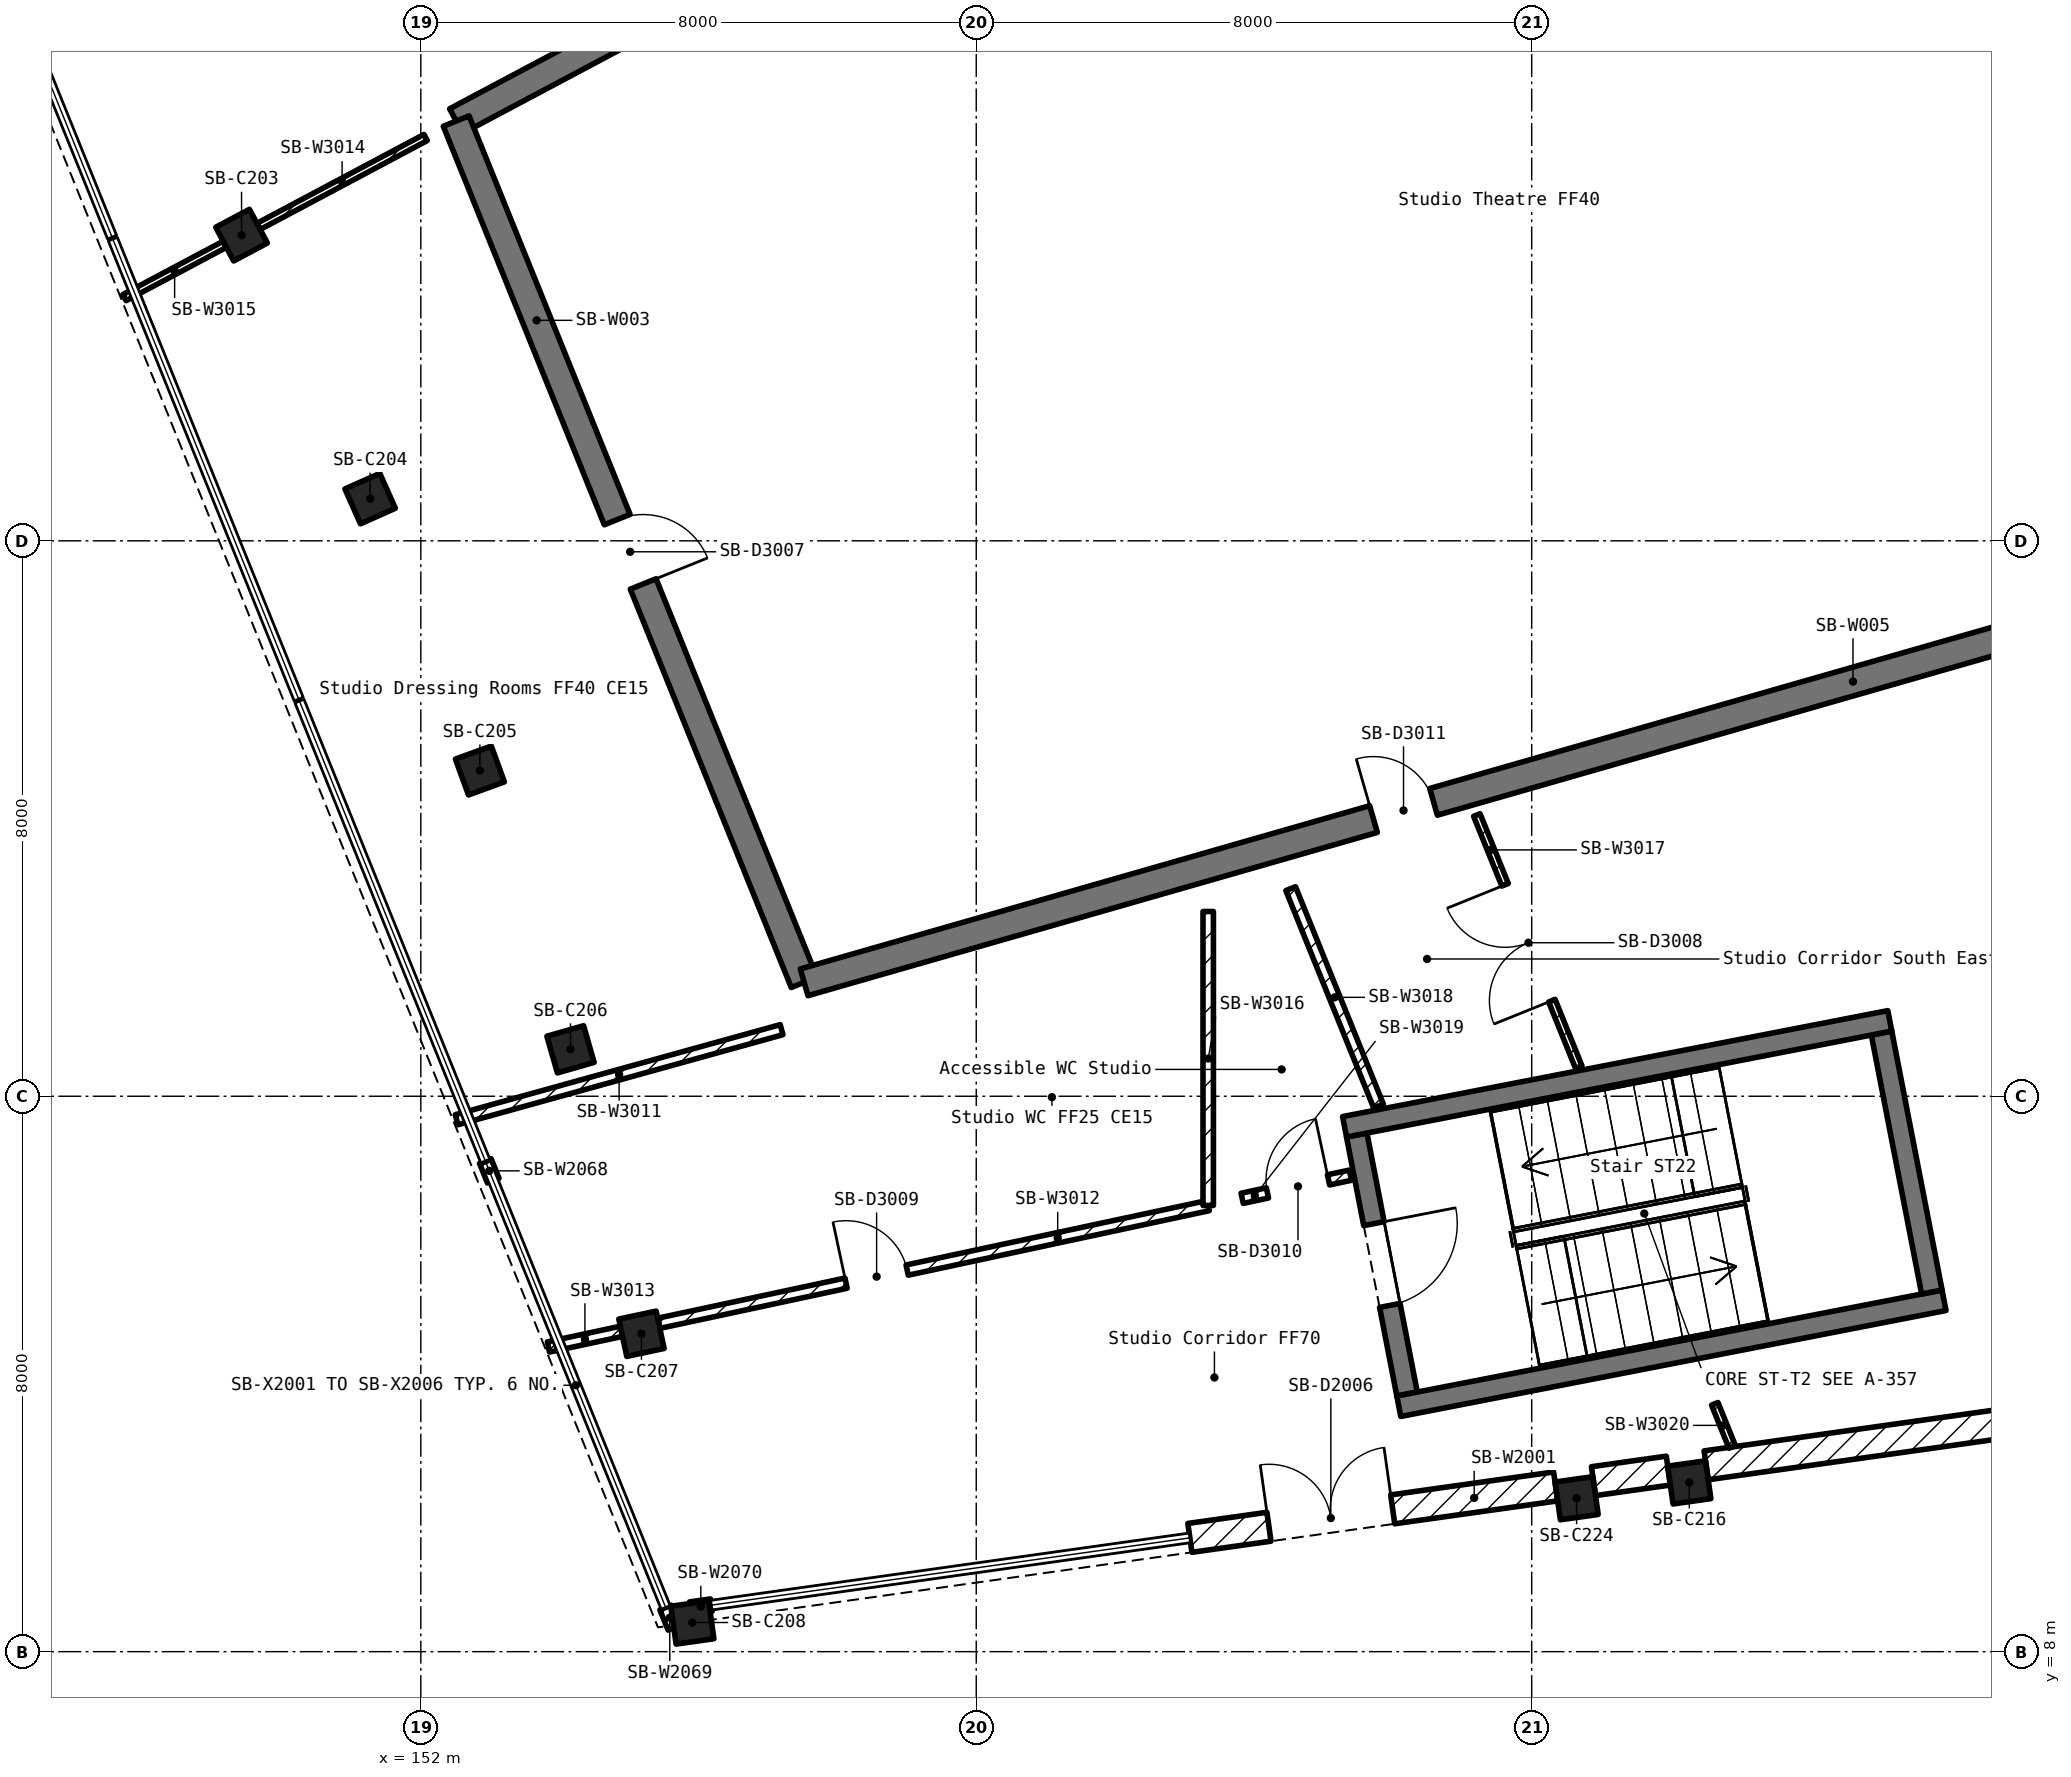
"""IFC4 building model, lengths in metres.
Left out: names, types, materials, properties, quantities, classifications, styles, units other than length and angle.
Written with IfcOpenShell. Run it as: python <this file> out.ifc"""

import sys

from ifc_helpers import new_model, si_unit, direction, frame, frame_2d, origin, origin_2d, place, context, subcontext, project, spatial, rectangle, extrude, element, fill, save


model = new_model("IFC4")
c1 = context("Model", 3, precision=1e-05, world=origin(), true_north=direction((0.0, 1.0)))
c2 = subcontext(c1, "Body", "Model", "MODEL_VIEW")
j1 = project(units=[si_unit("LENGTHUNIT", "METRE"), si_unit("PLANEANGLEUNIT", "RADIAN")], contexts=[c1])
p1 = place(None, origin())
s1 = spatial("IfcSite", under=j1, at=p1, CompositionType="ELEMENT")
p2 = place(p1, origin())
s2 = spatial("IfcBuilding", under=s1, at=p2, CompositionType="ELEMENT")
p3 = place(p2, origin())
s3 = spatial("IfcBuildingStorey", under=s2, at=p3, CompositionType="ELEMENT", Elevation=0.0)
for number, where, z_axis, x_axis in (
    (1, (149.418, 28.403, 0.0), (0.0, 0.0, 1.0), (0.469, -0.883, 0.0)),
    (2, (151.27, 24.608, 0.0), (0.0, 0.0, 1.0), (0.407, -0.914, 0.0)),
    (3, (152.851, 20.692, 0.0), (0.0, 0.0, 1.0), (0.342, -0.94, 0.0)),
    (4, (154.156, 16.676, 0.0), (0.0, 0.0, 1.0), (0.276, -0.961, 0.0)),
    (5, (155.178, 12.579, 0.0), (0.0, 0.0, 1.0), (0.208, -0.978, 0.0)),
    (6, (155.911, 8.42, 0.0), (0.0, 0.0, 1.0), (0.139, -0.99, 0.0)),
    (7, (170.27, 10.438, 0.0), (0.0, 0.0, 1.0), (0.139, -0.99, 0.0)),
    (8, (168.647, 10.21, 0.0), (0.0, 0.0, 1.0), (0.139, -0.99, 0.0)),
):
    element("IfcColumn", number, at=place(p3, frame(where, z_axis=z_axis, x_axis=x_axis)), inside=s3, PredefinedType="COLUMN", context=c2, shape_type="SweptSolid", body=[
        extrude(rectangle(XDim=0.55, YDim=0.55, at=origin_2d()), origin(), (0.0, 0.0, 1.0), 6.0),
    ])
p4 = place(p3, frame((171.933, 40.375, -6.3), z_axis=(0.0, 0.0, 1.0), x_axis=(-0.882926128241, -0.469511929634, 0.0)))
e9 = element("IfcWall", 9, at=p4, inside=s3, PredefinedType="SHEAR", context=c2, shape_type="SweptSolid", body=[
    extrude(rectangle(XDim=22.0, YDim=0.4, at=frame_2d((11.0, 0.0))), origin(), (0.0, 0.0, 1.0), 12.3),
])
p5 = place(p3, frame((152.509, 30.046, -6.3), z_axis=(0.0, 0.0, 1.0), x_axis=(0.374613299166, -0.92718114524, 0.0)))
e10 = element("IfcWall", 10, at=p5, inside=s3, PredefinedType="SHEAR", context=c2, shape_type="SweptSolid", body=[
    extrude(rectangle(XDim=13.379, YDim=0.4, at=frame_2d((6.689, 0.0))), origin(), (0.0, 0.0, 1.0), 12.3),
])
p6 = place(p5, frame((6.191, 0.0, 6.3)))
e11 = element("IfcOpeningElement", 11, at=p6, cuts=e10, PredefinedType="OPENING", context=c2, shape_type="SweptSolid", body=[
    extrude(rectangle(XDim=1.0, YDim=2.1, at=frame_2d((0.5, 1.05))), frame((0.0, 0.212, 0.0), z_axis=(0.0, -1.0, 0.0), x_axis=(1.0, 0.0, 0.0)), (0.0, 0.0, 1.0), 0.424),
])
p7 = place(p3, frame((157.521, 17.641, -6.3), z_axis=(0.0, 0.0, 1.0), x_axis=(0.961263044958, 0.275632651182, 0.0)))
e12 = element("IfcWall", 12, at=p7, inside=s3, PredefinedType="SHEAR", context=c2, shape_type="SweptSolid", body=[
    extrude(rectangle(XDim=22.0, YDim=0.4, at=frame_2d((11.0, 0.0))), origin(), (0.0, 0.0, 1.0), 12.3),
])
p8 = place(p7, frame((8.531, 0.0, 6.3)))
e13 = element("IfcOpeningElement", 13, at=p8, cuts=e12, PredefinedType="OPENING", context=c2, shape_type="SweptSolid", body=[
    extrude(rectangle(XDim=0.9, YDim=2.1, at=frame_2d((0.45, 1.05))), frame((0.0, 0.212, 0.0), z_axis=(0.0, -1.0, 0.0), x_axis=(1.0, 0.0, 0.0)), (0.0, 0.0, 1.0), 0.424),
])
p9 = place(p3, frame((178.669, 23.705, -6.3), z_axis=(0.0, 0.0, 1.0), x_axis=(-0.374642655757, 0.92716928362, 0.0)))
e14 = element("IfcWall", 14, at=p9, inside=s3, PredefinedType="SHEAR", context=c2, shape_type="SweptSolid", body=[
    extrude(rectangle(XDim=17.979, YDim=0.4, at=frame_2d((8.99, 0.0))), origin(), (0.0, 0.0, 1.0), 12.3),
])
p10 = place(p9, frame((8.09, 0.0, 6.3)))
e15 = element("IfcOpeningElement", 15, at=p10, cuts=e14, PredefinedType="OPENING", context=c2, shape_type="SweptSolid", body=[
    extrude(rectangle(XDim=1.8, YDim=2.1, at=frame_2d((0.9, 1.05))), frame((0.0, 0.212, 0.0), z_axis=(0.0, -1.0, 0.0), x_axis=(1.0, 0.0, 0.0)), (0.0, 0.0, 1.0), 0.424),
])
p11 = place(p9, frame((12.59, 0.0, 6.3)))
e16 = element("IfcOpeningElement", 16, at=p11, cuts=e14, PredefinedType="OPENING", context=c2, shape_type="SweptSolid", body=[
    extrude(rectangle(XDim=1.8, YDim=2.1, at=frame_2d((0.9, 1.05))), frame((0.0, 0.212, 0.0), z_axis=(0.0, -1.0, 0.0), x_axis=(1.0, 0.0, 0.0)), (0.0, 0.0, 1.0), 0.424),
])
p12 = place(p3, frame((163.077, 9.639, 0.0), z_axis=(0.0, 0.0, 1.0), x_axis=(0.990252820999, 0.139281551197, 0.0)))
e17 = element("IfcWall", 17, at=p12, inside=s3, PredefinedType="SOLIDWALL", context=c2, shape_type="SweptSolid", body=[
    extrude(rectangle(XDim=5.32, YDim=0.42, at=frame_2d((2.66, 0.0))), origin(), (0.0, 0.0, 1.0), 4.98),
])
p13 = place(p12, frame((1.15, 0.0, 0.0)))
e18 = element("IfcOpeningElement", 18, at=p13, cuts=e17, PredefinedType="OPENING", context=c2, shape_type="SweptSolid", body=[
    extrude(rectangle(XDim=1.8, YDim=2.4, at=frame_2d((0.9, 1.2))), frame((0.0, 0.222, 0.0), z_axis=(0.0, -1.0, 0.0), x_axis=(1.0, 0.0, 0.0)), (0.0, 0.0, 1.0), 0.444),
])
p14 = place(p3, frame((168.89, 10.456, 0.0), z_axis=(0.0, 0.0, 1.0), x_axis=(0.990225632743, 0.139474715481, 0.0)))
e19 = element("IfcWall", 19, at=p14, inside=s3, PredefinedType="SOLIDWALL", context=c2, shape_type="SweptSolid", body=[
    extrude(rectangle(XDim=1.089, YDim=0.42, at=frame_2d((0.544, 0.0))), origin(), (0.0, 0.0, 1.0), 4.98),
])
p15 = place(p3, frame((170.513, 10.684, 0.0), z_axis=(0.0, 0.0, 1.0), x_axis=(0.990259181758, 0.139236320493, 0.0)))
e20 = element("IfcWall", 20, at=p15, inside=s3, PredefinedType="SOLIDWALL", context=c2, shape_type="SweptSolid", body=[
    extrude(rectangle(XDim=7.275, YDim=0.42, at=frame_2d((3.637, 0.0))), origin(), (0.0, 0.0, 1.0), 5.78),
])
p16 = place(p3, frame((165.48, 15.441, 0.0), z_axis=(0.0, 0.0, 1.0), x_axis=(0.190824946063, -0.981624082814, 0.0)))
e21 = element("IfcWall", 21, at=p16, inside=s3, PredefinedType="SOLIDWALL", context=c2, shape_type="SweptSolid", body=[
    extrude(rectangle(XDim=3.8, YDim=0.3, at=frame_2d((1.9, 0.0))), origin(), (0.0, 0.0, 1.0), 6.0),
])
p17 = place(p16, frame((1.3, 0.0, 0.0)))
e22 = element("IfcOpeningElement", 22, at=p17, cuts=e21, PredefinedType="OPENING", context=c2, shape_type="SweptSolid", body=[
    extrude(rectangle(XDim=1.2, YDim=2.1, at=frame_2d((0.6, 1.05))), frame((0.0, 0.162, 0.0), z_axis=(0.0, -1.0, 0.0), x_axis=(1.0, 0.0, 0.0)), (0.0, 0.0, 1.0), 0.324),
])
p18 = place(p3, frame((166.086, 11.535, 0.0), z_axis=(0.0, 0.0, 1.0), x_axis=(0.981635396686, 0.190766737073, 0.0)))
e23 = element("IfcWall", 23, at=p18, inside=s3, PredefinedType="SOLIDWALL", context=c2, shape_type="SweptSolid", body=[
    extrude(rectangle(XDim=8.0, YDim=0.3, at=frame_2d((4.0, 0.0))), origin(), (0.0, 0.0, 1.0), 6.0),
])
p19 = place(p3, frame((173.764, 13.18, 0.0), z_axis=(0.0, 0.0, 1.0), x_axis=(-0.190763033741, 0.981636116368, 0.0)))
e24 = element("IfcWall", 24, at=p19, inside=s3, PredefinedType="SOLIDWALL", context=c2, shape_type="SweptSolid", body=[
    extrude(rectangle(XDim=3.8, YDim=0.3, at=frame_2d((1.9, 0.0))), origin(), (0.0, 0.0, 1.0), 6.0),
])
p20 = place(p3, frame((173.158, 17.086, 0.0), z_axis=(0.0, 0.0, 1.0), x_axis=(-0.981641111144, -0.190737329623, 0.0)))
e25 = element("IfcWall", 25, at=p20, inside=s3, PredefinedType="SOLIDWALL", context=c2, shape_type="SweptSolid", body=[
    extrude(rectangle(XDim=8.0, YDim=0.3, at=frame_2d((4.0, 0.0))), origin(), (0.0, 0.0, 1.0), 6.0),
])
p21 = place(p3, frame((152.516, 15.662, 0.0), z_axis=(0.0, 0.0, 1.0), x_axis=(0.963682662367, 0.267050044473, 0.0)))
e26 = element("IfcWall", 26, at=p21, inside=s3, PredefinedType="PARTITIONING", context=c2, shape_type="SweptSolid", body=[
    extrude(rectangle(XDim=4.856, YDim=0.15, at=frame_2d((2.428, 0.0))), origin(), (0.0, 0.0, 1.0), 4.88),
])
p22 = place(p3, frame((155.428, 12.73, 0.0), z_axis=(0.0, 0.0, 1.0), x_axis=(0.977817422175, 0.209459038694, 0.0)))
e27 = element("IfcWall", 27, at=p22, inside=s3, PredefinedType="PARTITIONING", context=c2, shape_type="SweptSolid", body=[
    extrude(rectangle(XDim=8.093, YDim=0.15, at=frame_2d((4.046, 0.0))), origin(), (0.0, 0.0, 1.0), 4.88),
])
p23 = place(p22, frame((2.758, 0.0, 0.0)))
e28 = element("IfcOpeningElement", 28, at=p23, cuts=e27, PredefinedType="OPENING", context=c2, shape_type="SweptSolid", body=[
    extrude(rectangle(XDim=0.9, YDim=2.1, at=frame_2d((0.45, 1.05))), frame((0.0, 0.087, 0.0), z_axis=(0.0, -1.0, 0.0), x_axis=(1.0, 0.0, 0.0)), (0.0, 0.0, 1.0), 0.174),
])
p24 = place(p3, frame((153.838, 12.389, 0.0), z_axis=(0.0, 0.0, 1.0), x_axis=(0.977825675762, 0.209420504774, 0.0)))
e29 = element("IfcWall", 29, at=p24, inside=s3, PredefinedType="PARTITIONING", context=c2, shape_type="SweptSolid", body=[
    extrude(rectangle(XDim=1.075, YDim=0.15, at=frame_2d((0.538, 0.0))), origin(), (0.0, 0.0, 1.0), 4.88),
])
p25 = place(p3, frame((149.663, 28.529, 0.0), z_axis=(0.0, 0.0, 1.0), x_axis=(0.882836035131, 0.469681312247, 0.0)))
e30 = element("IfcWall", 30, at=p25, inside=s3, PredefinedType="PARTITIONING", context=c2, shape_type="SweptSolid", body=[
    extrude(rectangle(XDim=2.725, YDim=0.1, at=frame_2d((1.363, 0.0))), origin(), (0.0, 0.0, 1.0), 4.88),
])
p26 = place(p3, frame((147.732, 27.503, 0.0), z_axis=(0.0, 0.0, 1.0), x_axis=(0.882889505907, 0.469580792153, 0.0)))
e31 = element("IfcWall", 31, at=p26, inside=s3, PredefinedType="PARTITIONING", context=c2, shape_type="SweptSolid", body=[
    extrude(rectangle(XDim=1.636, YDim=0.1, at=frame_2d((0.818, 0.0))), origin(), (0.0, 0.0, 1.0), 4.88),
])
p27 = place(p3, frame((163.341, 14.427, 0.0), z_axis=(0.0, 0.0, 1.0), x_axis=(0.0, 1.0, 0.0)))
e32 = element("IfcWall", 32, at=p27, inside=s3, PredefinedType="PARTITIONING", context=c2, shape_type="SweptSolid", body=[
    extrude(rectangle(XDim=4.234, YDim=0.15, at=frame_2d((2.117, 0.0))), origin(), (0.0, 0.0, 1.0), 4.88),
])
p28 = place(p3, frame((168.678, 16.419, 0.0), z_axis=(0.0, 0.0, 1.0), x_axis=(-0.374729910149, 0.927134021833, 0.0)))
e33 = element("IfcWall", 33, at=p28, inside=s3, PredefinedType="PARTITIONING", context=c2, shape_type="SweptSolid", body=[
    extrude(rectangle(XDim=3.917, YDim=0.1, at=frame_2d((1.959, 0.0))), origin(), (0.0, 0.0, 1.0), 4.88),
])
p29 = place(p28, frame((1.033, 0.0, 0.0)))
e34 = element("IfcOpeningElement", 34, at=p29, cuts=e33, PredefinedType="OPENING", context=c2, shape_type="SweptSolid", body=[
    extrude(rectangle(XDim=1.8, YDim=2.1, at=frame_2d((0.9, 1.05))), frame((0.0, 0.062, 0.0), z_axis=(0.0, -1.0, 0.0), x_axis=(1.0, 0.0, 0.0)), (0.0, 0.0, 1.0), 0.124),
])
p30 = place(p3, frame((165.794, 15.859, 0.0), z_axis=(0.0, 0.0, 1.0), x_axis=(-0.374567043553, 0.927199832767, 0.0)))
e35 = element("IfcWall", 35, at=p30, inside=s3, PredefinedType="PARTITIONING", context=c2, shape_type="SweptSolid", body=[
    extrude(rectangle(XDim=3.377, YDim=0.15, at=frame_2d((1.688, 0.0))), origin(), (0.0, 0.0, 1.0), 4.88),
])
p31 = place(p3, frame((163.83, 14.53, 0.0), z_axis=(0.0, 0.0, 1.0), x_axis=(0.97793446098, 0.208911919307, 0.0)))
e36 = element("IfcWall", 36, at=p31, inside=s3, PredefinedType="PARTITIONING", context=c2, shape_type="SweptSolid", body=[
    extrude(rectangle(XDim=1.594, YDim=0.15, at=frame_2d((0.797, 0.0))), origin(), (0.0, 0.0, 1.0), 4.88),
])
p32 = place(p31, frame((0.372, 0.0, 0.0)))
e37 = element("IfcOpeningElement", 37, at=p32, cuts=e36, PredefinedType="OPENING", context=c2, shape_type="SweptSolid", body=[
    extrude(rectangle(XDim=0.9, YDim=2.1, at=frame_2d((0.45, 1.05))), frame((0.0, 0.087, 0.0), z_axis=(0.0, -1.0, 0.0), x_axis=(1.0, 0.0, 0.0)), (0.0, 0.0, 1.0), 0.174),
])
p33 = place(p3, frame((170.888, 10.949, 0.0), z_axis=(0.0, 0.0, 1.0), x_axis=(-0.374655870393, 0.927163943852, 0.0)))
e38 = element("IfcWall", 38, at=p33, inside=s3, PredefinedType="PARTITIONING", context=c2, shape_type="SweptSolid", body=[
    extrude(rectangle(XDim=0.67, YDim=0.1, at=frame_2d((0.335, 0.0))), origin(), (0.0, 0.0, 1.0), 4.88),
])
p34 = place(p3, frame((152.929, 15.067, 0.0), z_axis=(0.0, 0.0, 1.0), x_axis=(0.373735167079, -0.927535457483, 0.0)))
e39 = element("IfcWall", 39, at=p34, inside=s3, PredefinedType="SOLIDWALL", context=c2, shape_type="SweptSolid", body=[
    extrude(rectangle(XDim=0.305, YDim=0.18, at=frame_2d((0.153, 0.0))), origin(), (0.0, 0.0, 1.0), 4.93),
])
p35 = place(p3, frame((155.527, 8.636, 0.0), z_axis=(0.0, 0.0, 1.0), x_axis=(0.374463049601, -0.927241837108, 0.0)))
e40 = element("IfcWall", 40, at=p35, inside=s3, PredefinedType="SOLIDWALL", context=c2, shape_type="SweptSolid", body=[
    extrude(rectangle(XDim=0.315, YDim=0.18, at=frame_2d((0.157, 0.0))), origin(), (0.0, 0.0, 1.0), 4.93),
])
p36 = place(p3, frame((156.184, 8.67, 0.0), z_axis=(0.0, 0.0, 1.0), x_axis=(-0.99047104668, -0.137721115626, 0.0)))
e41 = element("IfcWall", 41, at=p36, inside=s3, PredefinedType="SOLIDWALL", context=c2, shape_type="SweptSolid", body=[
    extrude(rectangle(XDim=0.305, YDim=0.18, at=frame_2d((0.152, 0.0))), origin(), (0.0, 0.0, 1.0), 4.13),
])
p37 = place(p17, origin())
e42 = element("IfcDoor", 42, at=p37, inside=s3, OperationType="SINGLE_SWING_LEFT", PredefinedType="DOOR", context=c2, shape_type="SweptSolid", body=[
    extrude(rectangle(XDim=1.2, YDim=2.1, at=frame_2d((0.6, 1.05))), frame((0.0, 0.025, 0.0), z_axis=(0.0, -1.0, 0.0), x_axis=(1.0, 0.0, 0.0)), (0.0, 0.0, 1.0), 0.05),
])
fill(e22, e42)
p38 = place(p6, origin())
e43 = element("IfcDoor", 43, at=p38, inside=s3, OperationType="SINGLE_SWING_RIGHT", PredefinedType="DOOR", context=c2, shape_type="SweptSolid", body=[
    extrude(rectangle(XDim=1.0, YDim=2.1, at=frame_2d((0.5, 1.05))), frame((0.0, 0.025, 0.0), z_axis=(0.0, -1.0, 0.0), x_axis=(1.0, 0.0, 0.0)), (0.0, 0.0, 1.0), 0.05),
])
fill(e11, e43)
p39 = place(p29, origin())
e44 = element("IfcDoor", 44, at=p39, inside=s3, OperationType="DOUBLE_DOOR_SINGLE_SWING", PredefinedType="DOOR", context=c2, shape_type="SweptSolid", body=[
    extrude(rectangle(XDim=1.8, YDim=2.1, at=frame_2d((0.9, 1.05))), frame((0.0, 0.025, 0.0), z_axis=(0.0, -1.0, 0.0), x_axis=(1.0, 0.0, 0.0)), (0.0, 0.0, 1.0), 0.05),
])
fill(e34, e44)
p40 = place(p23, origin())
e45 = element("IfcDoor", 45, at=p40, inside=s3, OperationType="SINGLE_SWING_LEFT", PredefinedType="DOOR", context=c2, shape_type="SweptSolid", body=[
    extrude(rectangle(XDim=0.9, YDim=2.1, at=frame_2d((0.45, 1.05))), frame((0.0, 0.025, 0.0), z_axis=(0.0, -1.0, 0.0), x_axis=(1.0, 0.0, 0.0)), (0.0, 0.0, 1.0), 0.05),
])
fill(e28, e45)
p41 = place(p32, origin())
e46 = element("IfcDoor", 46, at=p41, inside=s3, OperationType="SINGLE_SWING_RIGHT", PredefinedType="DOOR", context=c2, shape_type="SweptSolid", body=[
    extrude(rectangle(XDim=0.9, YDim=2.1, at=frame_2d((0.45, 1.05))), frame((0.0, 0.025, 0.0), z_axis=(0.0, -1.0, 0.0), x_axis=(1.0, 0.0, 0.0)), (0.0, 0.0, 1.0), 0.05),
])
fill(e37, e46)
p42 = place(p8, origin())
e47 = element("IfcDoor", 47, at=p42, inside=s3, OperationType="SINGLE_SWING_LEFT", PredefinedType="DOOR", context=c2, shape_type="SweptSolid", body=[
    extrude(rectangle(XDim=0.9, YDim=2.1, at=frame_2d((0.45, 1.05))), frame((0.0, 0.025, 0.0), z_axis=(0.0, -1.0, 0.0), x_axis=(1.0, 0.0, 0.0)), (0.0, 0.0, 1.0), 0.05),
])
fill(e13, e47)
p43 = place(p13, origin())
e48 = element("IfcDoor", 48, at=p43, inside=s3, OperationType="DOUBLE_DOOR_DOUBLE_SWING", PredefinedType="DOOR", context=c2, shape_type="SweptSolid", body=[
    extrude(rectangle(XDim=1.8, YDim=2.4, at=frame_2d((0.9, 1.2))), frame((0.0, 0.025, 0.0), z_axis=(0.0, -1.0, 0.0), x_axis=(1.0, 0.0, 0.0)), (0.0, 0.0, 1.0), 0.05),
])
fill(e18, e48)
save(model, sys.argv[1])
